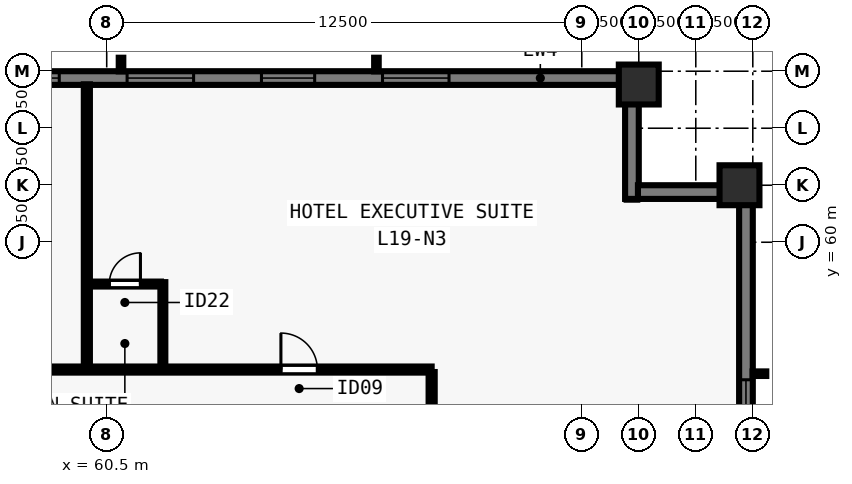
"""IFC4 building model, lengths in metres.
Left out: names, types, materials, properties, quantities, classifications, styles, units other than length and angle.
Written with IfcOpenShell. Run it as: python <this file> out.ifc"""

import sys

from ifc_helpers import new_model, si_unit, direction, frame, frame_2d, origin, origin_2d, place, context, subcontext, project, spatial, rectangle, extrude, element, fill, save


model = new_model("IFC4")
c1 = context("Model", 3, precision=1e-05, world=origin(), true_north=direction((0.0, 1.0)))
c2 = subcontext(c1, "Body", "Model", "MODEL_VIEW")
j1 = project(units=[si_unit("LENGTHUNIT", "METRE"), si_unit("PLANEANGLEUNIT", "RADIAN")], contexts=[c1])
p1 = place(None, origin())
s1 = spatial("IfcSite", under=j1, at=p1, CompositionType="ELEMENT")
p2 = place(p1, origin())
s2 = spatial("IfcBuilding", under=s1, at=p2, CompositionType="ELEMENT")
p3 = place(p2, frame((0.0, 0.0, 72.5)))
s3 = spatial("IfcBuildingStorey", under=s2, at=p3, CompositionType="ELEMENT", Elevation=72.5)
for number, where, z_axis, x_axis in (
    (1, (77.15, 61.5, 0.0), (0.0, 0.0, 1.0), (0.0, 1.0, 0.0)),
    (2, (74.5, 64.15, 0.0), (0.0, 0.0, 1.0), (1.0, 0.0, 0.0)),
):
    element("IfcColumn", number, at=place(p3, frame(where, z_axis=z_axis, x_axis=x_axis)), inside=s3, PredefinedType="COLUMN", context=c2, shape_type="SweptSolid", body=[
        extrude(rectangle(XDim=1.05, YDim=1.05, at=origin_2d()), origin(), (0.0, 0.0, 1.0), 3.5),
    ])
p4 = place(p3, frame((29.5, 64.32, 0.0), z_axis=(0.0, 0.0, 1.0), x_axis=(1.0, 0.0, 0.0)))
e3 = element("IfcWall", 3, at=p4, inside=s3, PredefinedType="SOLIDWALL", context=c2, shape_type="SweptSolid", body=[
    extrude(rectangle(XDim=44.662, YDim=0.36, at=frame_2d((22.331, 0.0))), origin(), (0.0, 0.0, 1.0), 3.28),
])
p5 = place(p4, frame((4.655, 0.0, 0.8)))
e4 = element("IfcOpeningElement", 4, at=p5, cuts=e3, PredefinedType="OPENING", context=c2, shape_type="SweptSolid", body=[
    extrude(rectangle(XDim=1.75, YDim=1.544, at=frame_2d((0.875, 0.772))), frame((0.0, 0.19, 0.0), z_axis=(0.0, -1.0, 0.0), x_axis=(1.0, 0.0, 0.0)), (0.0, 0.0, 1.0), 0.38),
])
p6 = place(p4, frame((8.19, 0.0, 0.8)))
e5 = element("IfcOpeningElement", 5, at=p6, cuts=e3, PredefinedType="OPENING", context=c2, shape_type="SweptSolid", body=[
    extrude(rectangle(XDim=1.4, YDim=1.544, at=frame_2d((0.7, 0.772))), frame((0.0, 0.19, 0.0), z_axis=(0.0, -1.0, 0.0), x_axis=(1.0, 0.0, 0.0)), (0.0, 0.0, 1.0), 0.38),
])
p7 = place(p4, frame((11.375, 0.0, 0.8)))
e6 = element("IfcOpeningElement", 6, at=p7, cuts=e3, PredefinedType="OPENING", context=c2, shape_type="SweptSolid", body=[
    extrude(rectangle(XDim=1.75, YDim=1.544, at=frame_2d((0.875, 0.772))), frame((0.0, 0.19, 0.0), z_axis=(0.0, -1.0, 0.0), x_axis=(1.0, 0.0, 0.0)), (0.0, 0.0, 1.0), 0.38),
])
p8 = place(p4, frame((15.361, 0.0, 0.8)))
e7 = element("IfcOpeningElement", 7, at=p8, cuts=e3, PredefinedType="OPENING", context=c2, shape_type="SweptSolid", body=[
    extrude(rectangle(XDim=1.4, YDim=1.544, at=frame_2d((0.7, 0.772))), frame((0.0, 0.19, 0.0), z_axis=(0.0, -1.0, 0.0), x_axis=(1.0, 0.0, 0.0)), (0.0, 0.0, 1.0), 0.38),
])
p9 = place(p4, frame((18.546, 0.0, 0.8)))
e8 = element("IfcOpeningElement", 8, at=p9, cuts=e3, PredefinedType="OPENING", context=c2, shape_type="SweptSolid", body=[
    extrude(rectangle(XDim=1.75, YDim=1.544, at=frame_2d((0.875, 0.772))), frame((0.0, 0.19, 0.0), z_axis=(0.0, -1.0, 0.0), x_axis=(1.0, 0.0, 0.0)), (0.0, 0.0, 1.0), 0.38),
])
p10 = place(p4, frame((21.631, 0.0, 0.8)))
e9 = element("IfcOpeningElement", 9, at=p10, cuts=e3, PredefinedType="OPENING", context=c2, shape_type="SweptSolid", body=[
    extrude(rectangle(XDim=1.4, YDim=1.544, at=frame_2d((0.7, 0.772))), frame((0.0, 0.19, 0.0), z_axis=(0.0, -1.0, 0.0), x_axis=(1.0, 0.0, 0.0)), (0.0, 0.0, 1.0), 0.38),
])
p11 = place(p4, frame((24.366, 0.0, 0.8)))
e10 = element("IfcOpeningElement", 10, at=p11, cuts=e3, PredefinedType="OPENING", context=c2, shape_type="SweptSolid", body=[
    extrude(rectangle(XDim=1.75, YDim=1.544, at=frame_2d((0.875, 0.772))), frame((0.0, 0.19, 0.0), z_axis=(0.0, -1.0, 0.0), x_axis=(1.0, 0.0, 0.0)), (0.0, 0.0, 1.0), 0.38),
])
p12 = place(p4, frame((28.351, 0.0, 0.8)))
e11 = element("IfcOpeningElement", 11, at=p12, cuts=e3, PredefinedType="OPENING", context=c2, shape_type="SweptSolid", body=[
    extrude(rectangle(XDim=1.4, YDim=1.544, at=frame_2d((0.7, 0.772))), frame((0.0, 0.19, 0.0), z_axis=(0.0, -1.0, 0.0), x_axis=(1.0, 0.0, 0.0)), (0.0, 0.0, 1.0), 0.38),
])
p13 = place(p4, frame((31.537, 0.0, 0.8)))
e12 = element("IfcOpeningElement", 12, at=p13, cuts=e3, PredefinedType="OPENING", context=c2, shape_type="SweptSolid", body=[
    extrude(rectangle(XDim=1.75, YDim=1.544, at=frame_2d((0.875, 0.772))), frame((0.0, 0.19, 0.0), z_axis=(0.0, -1.0, 0.0), x_axis=(1.0, 0.0, 0.0)), (0.0, 0.0, 1.0), 0.38),
])
p14 = place(p4, frame((35.072, 0.0, 0.8)))
e13 = element("IfcOpeningElement", 13, at=p14, cuts=e3, PredefinedType="OPENING", context=c2, shape_type="SweptSolid", body=[
    extrude(rectangle(XDim=1.4, YDim=1.544, at=frame_2d((0.7, 0.772))), frame((0.0, 0.19, 0.0), z_axis=(0.0, -1.0, 0.0), x_axis=(1.0, 0.0, 0.0)), (0.0, 0.0, 1.0), 0.38),
])
p15 = place(p4, frame((38.257, 0.0, 0.8)))
e14 = element("IfcOpeningElement", 14, at=p15, cuts=e3, PredefinedType="OPENING", context=c2, shape_type="SweptSolid", body=[
    extrude(rectangle(XDim=1.75, YDim=1.544, at=frame_2d((0.875, 0.772))), frame((0.0, 0.19, 0.0), z_axis=(0.0, -1.0, 0.0), x_axis=(1.0, 0.0, 0.0)), (0.0, 0.0, 1.0), 0.38),
])
p16 = place(p3, frame((74.32, 64.5, 0.0), z_axis=(0.0, 0.0, 1.0), x_axis=(0.0, -1.0, 0.0)))
e15 = element("IfcWall", 15, at=p16, inside=s3, PredefinedType="SOLIDWALL", context=c2, shape_type="SweptSolid", body=[
    extrude(rectangle(XDim=3.36, YDim=0.36, at=frame_2d((1.68, 0.0))), origin(), (0.0, 0.0, 1.0), 3.28),
])
p17 = place(p3, frame((74.478, 61.32, 0.0), z_axis=(0.0, 0.0, 1.0), x_axis=(1.0, 0.0, 0.0)))
e16 = element("IfcWall", 16, at=p17, inside=s3, PredefinedType="SOLIDWALL", context=c2, shape_type="SweptSolid", body=[
    extrude(rectangle(XDim=2.684, YDim=0.36, at=frame_2d((1.342, 0.0))), origin(), (0.0, 0.0, 1.0), 3.28),
])
p18 = place(p3, frame((77.32, 61.5, 0.0), z_axis=(0.0, 0.0, 1.0), x_axis=(0.0, -1.0, 0.0)))
e17 = element("IfcWall", 17, at=p18, inside=s3, PredefinedType="SOLIDWALL", context=c2, shape_type="SweptSolid", body=[
    extrude(rectangle(XDim=17.962, YDim=0.36, at=frame_2d((8.981, 0.0))), origin(), (0.0, 0.0, 1.0), 3.28),
])
p19 = place(p18, frame((5.119, 0.0, 0.8)))
e18 = element("IfcOpeningElement", 18, at=p19, cuts=e17, PredefinedType="OPENING", context=c2, shape_type="SweptSolid", body=[
    extrude(rectangle(XDim=1.75, YDim=1.544, at=frame_2d((0.875, 0.772))), frame((0.0, 0.19, 0.0), z_axis=(0.0, -1.0, 0.0), x_axis=(1.0, 0.0, 0.0)), (0.0, 0.0, 1.0), 0.38),
])
p20 = place(p18, frame((9.581, 0.0, 0.8)))
e19 = element("IfcOpeningElement", 19, at=p20, cuts=e17, PredefinedType="OPENING", context=c2, shape_type="SweptSolid", body=[
    extrude(rectangle(XDim=1.4, YDim=1.544, at=frame_2d((0.7, 0.772))), frame((0.0, 0.19, 0.0), z_axis=(0.0, -1.0, 0.0), x_axis=(1.0, 0.0, 0.0)), (0.0, 0.0, 1.0), 0.38),
])
p21 = place(p18, frame((13.693, 0.0, 0.8)))
e20 = element("IfcOpeningElement", 20, at=p21, cuts=e17, PredefinedType="OPENING", context=c2, shape_type="SweptSolid", body=[
    extrude(rectangle(XDim=1.75, YDim=1.544, at=frame_2d((0.875, 0.772))), frame((0.0, 0.19, 0.0), z_axis=(0.0, -1.0, 0.0), x_axis=(1.0, 0.0, 0.0)), (0.0, 0.0, 1.0), 0.38),
])
p22 = place(p3, frame((34.95, 56.65, 0.0), z_axis=(0.0, 0.0, 1.0), x_axis=(1.0, 0.0, 0.0)))
e21 = element("IfcWall", 21, at=p22, inside=s3, PredefinedType="PARTITIONING", context=c2, shape_type="SweptSolid", body=[
    extrude(rectangle(XDim=34.1, YDim=0.16, at=frame_2d((17.05, 0.0))), origin(), (0.0, 0.0, 1.0), 3.28),
])
p23 = place(p22, frame((4.166, 0.0, 0.0)))
e22 = element("IfcOpeningElement", 22, at=p23, cuts=e21, PredefinedType="OPENING", context=c2, shape_type="SweptSolid", body=[
    extrude(rectangle(XDim=0.96, YDim=2.15, at=frame_2d((0.48, 1.075))), frame((0.0, 0.09, 0.0), z_axis=(0.0, -1.0, 0.0), x_axis=(1.0, 0.0, 0.0)), (0.0, 0.0, 1.0), 0.18),
])
p24 = place(p22, frame((17.73, 0.0, 0.0)))
e23 = element("IfcOpeningElement", 23, at=p24, cuts=e21, PredefinedType="OPENING", context=c2, shape_type="SweptSolid", body=[
    extrude(rectangle(XDim=0.96, YDim=2.15, at=frame_2d((0.48, 1.075))), frame((0.0, 0.09, 0.0), z_axis=(0.0, -1.0, 0.0), x_axis=(1.0, 0.0, 0.0)), (0.0, 0.0, 1.0), 0.18),
])
p25 = place(p22, frame((30.134, 0.0, 0.0)))
e24 = element("IfcOpeningElement", 24, at=p25, cuts=e21, PredefinedType="OPENING", context=c2, shape_type="SweptSolid", body=[
    extrude(rectangle(XDim=0.96, YDim=2.15, at=frame_2d((0.48, 1.075))), frame((0.0, 0.09, 0.0), z_axis=(0.0, -1.0, 0.0), x_axis=(1.0, 0.0, 0.0)), (0.0, 0.0, 1.0), 0.18),
])
p26 = place(p3, frame((69.05, 21.415, 0.0), z_axis=(0.0, 0.0, 1.0), x_axis=(0.0, 1.0, 0.0)))
e25 = element("IfcWall", 25, at=p26, inside=s3, PredefinedType="PARTITIONING", context=c2, shape_type="SweptSolid", body=[
    extrude(rectangle(XDim=35.17, YDim=0.16, at=frame_2d((17.585, 0.0))), origin(), (0.0, 0.0, 1.0), 3.28),
])
p27 = place(p26, frame((9.746, 0.0, 0.0)))
e26 = element("IfcOpeningElement", 26, at=p27, cuts=e25, PredefinedType="OPENING", context=c2, shape_type="SweptSolid", body=[
    extrude(rectangle(XDim=0.96, YDim=2.15, at=frame_2d((0.48, 1.075))), frame((0.0, 0.09, 0.0), z_axis=(0.0, -1.0, 0.0), x_axis=(1.0, 0.0, 0.0)), (0.0, 0.0, 1.0), 0.18),
])
p28 = place(p26, frame((27.146, 0.0, 0.0)))
e27 = element("IfcOpeningElement", 27, at=p28, cuts=e25, PredefinedType="OPENING", context=c2, shape_type="SweptSolid", body=[
    extrude(rectangle(XDim=0.96, YDim=2.15, at=frame_2d((0.48, 1.075))), frame((0.0, 0.09, 0.0), z_axis=(0.0, -1.0, 0.0), x_axis=(1.0, 0.0, 0.0)), (0.0, 0.0, 1.0), 0.18),
])
p29 = place(p3, frame((59.978, 56.715, 0.0), z_axis=(0.0, 0.0, 1.0), x_axis=(0.0, 1.0, 0.0)))
e28 = element("IfcWall", 28, at=p29, inside=s3, PredefinedType="PARTITIONING", context=c2, shape_type="SweptSolid", body=[
    extrude(rectangle(XDim=7.44, YDim=0.16, at=frame_2d((3.72, 0.0))), origin(), (0.0, 0.0, 1.0), 3.28),
])
p30 = place(p3, frame((61.978, 56.715, 0.0), z_axis=(0.0, 0.0, 1.0), x_axis=(0.0, 1.0, 0.0)))
e29 = element("IfcWall", 29, at=p30, inside=s3, PredefinedType="PLUMBINGWALL", context=c2, shape_type="SweptSolid", body=[
    extrude(rectangle(XDim=2.235, YDim=0.13, at=frame_2d((1.117, 0.0))), origin(), (0.0, 0.0, 1.0), 3.28),
])
p31 = place(p3, frame((60.042, 58.9, 0.0), z_axis=(0.0, 0.0, 1.0), x_axis=(1.0, 0.0, 0.0)))
e30 = element("IfcWall", 30, at=p31, inside=s3, PredefinedType="PLUMBINGWALL", context=c2, shape_type="SweptSolid", body=[
    extrude(rectangle(XDim=1.885, YDim=0.13, at=frame_2d((0.942, 0.0))), origin(), (0.0, 0.0, 1.0), 3.28),
])
p32 = place(p31, frame((0.525, 0.0, 0.0)))
e31 = element("IfcOpeningElement", 31, at=p32, cuts=e30, PredefinedType="OPENING", context=c2, shape_type="SweptSolid", body=[
    extrude(rectangle(XDim=0.82, YDim=2.1, at=frame_2d((0.41, 1.05))), frame((0.0, 0.075, 0.0), z_axis=(0.0, -1.0, 0.0), x_axis=(1.0, 0.0, 0.0)), (0.0, 0.0, 1.0), 0.15),
])
p33 = place(p12, origin())
e32 = element("IfcWindow", 32, at=p33, inside=s3, PartitioningType="SINGLE_PANEL", PredefinedType="WINDOW", context=c2, shape_type="SweptSolid", body=[
    extrude(rectangle(XDim=1.4, YDim=1.544, at=frame_2d((0.7, 0.772))), frame((0.0, -0.05, 0.0), z_axis=(0.0, -1.0, 0.0), x_axis=(1.0, 0.0, 0.0)), (0.0, 0.0, 1.0), 0.06),
])
fill(e11, e32)
p34 = place(p13, origin())
e33 = element("IfcWindow", 33, at=p34, inside=s3, PartitioningType="SINGLE_PANEL", PredefinedType="WINDOW", context=c2, shape_type="SweptSolid", body=[
    extrude(rectangle(XDim=1.75, YDim=1.544, at=frame_2d((0.875, 0.772))), frame((0.0, -0.05, 0.0), z_axis=(0.0, -1.0, 0.0), x_axis=(1.0, 0.0, 0.0)), (0.0, 0.0, 1.0), 0.06),
])
fill(e12, e33)
p35 = place(p14, origin())
e34 = element("IfcWindow", 34, at=p35, inside=s3, PartitioningType="SINGLE_PANEL", PredefinedType="WINDOW", context=c2, shape_type="SweptSolid", body=[
    extrude(rectangle(XDim=1.4, YDim=1.544, at=frame_2d((0.7, 0.772))), frame((0.0, -0.05, 0.0), z_axis=(0.0, -1.0, 0.0), x_axis=(1.0, 0.0, 0.0)), (0.0, 0.0, 1.0), 0.06),
])
fill(e13, e34)
p36 = place(p15, origin())
e35 = element("IfcWindow", 35, at=p36, inside=s3, PartitioningType="SINGLE_PANEL", PredefinedType="WINDOW", context=c2, shape_type="SweptSolid", body=[
    extrude(rectangle(XDim=1.75, YDim=1.544, at=frame_2d((0.875, 0.772))), frame((0.0, -0.05, 0.0), z_axis=(0.0, -1.0, 0.0), x_axis=(1.0, 0.0, 0.0)), (0.0, 0.0, 1.0), 0.06),
])
fill(e14, e35)
p37 = place(p19, origin())
e36 = element("IfcWindow", 36, at=p37, inside=s3, PartitioningType="SINGLE_PANEL", PredefinedType="WINDOW", context=c2, shape_type="SweptSolid", body=[
    extrude(rectangle(XDim=1.75, YDim=1.544, at=frame_2d((0.875, 0.772))), frame((0.0, -0.05, 0.0), z_axis=(0.0, -1.0, 0.0), x_axis=(1.0, 0.0, 0.0)), (0.0, 0.0, 1.0), 0.06),
])
fill(e18, e36)
p38 = place(p32, origin())
e37 = element("IfcDoor", 37, at=p38, inside=s3, OperationType="SINGLE_SWING_RIGHT", PredefinedType="DOOR", context=c2, shape_type="SweptSolid", body=[
    extrude(rectangle(XDim=0.82, YDim=2.1, at=frame_2d((0.41, 1.05))), frame((0.0, 0.025, 0.0), z_axis=(0.0, -1.0, 0.0), x_axis=(1.0, 0.0, 0.0)), (0.0, 0.0, 1.0), 0.05),
])
fill(e31, e37)
p39 = place(p25, origin())
e38 = element("IfcDoor", 38, at=p39, inside=s3, OperationType="SINGLE_SWING_LEFT", PredefinedType="DOOR", context=c2, shape_type="SweptSolid", body=[
    extrude(rectangle(XDim=0.96, YDim=2.15, at=frame_2d((0.48, 1.075))), frame((0.0, 0.025, 0.0), z_axis=(0.0, -1.0, 0.0), x_axis=(1.0, 0.0, 0.0)), (0.0, 0.0, 1.0), 0.05),
])
fill(e24, e38)
save(model, sys.argv[1])
